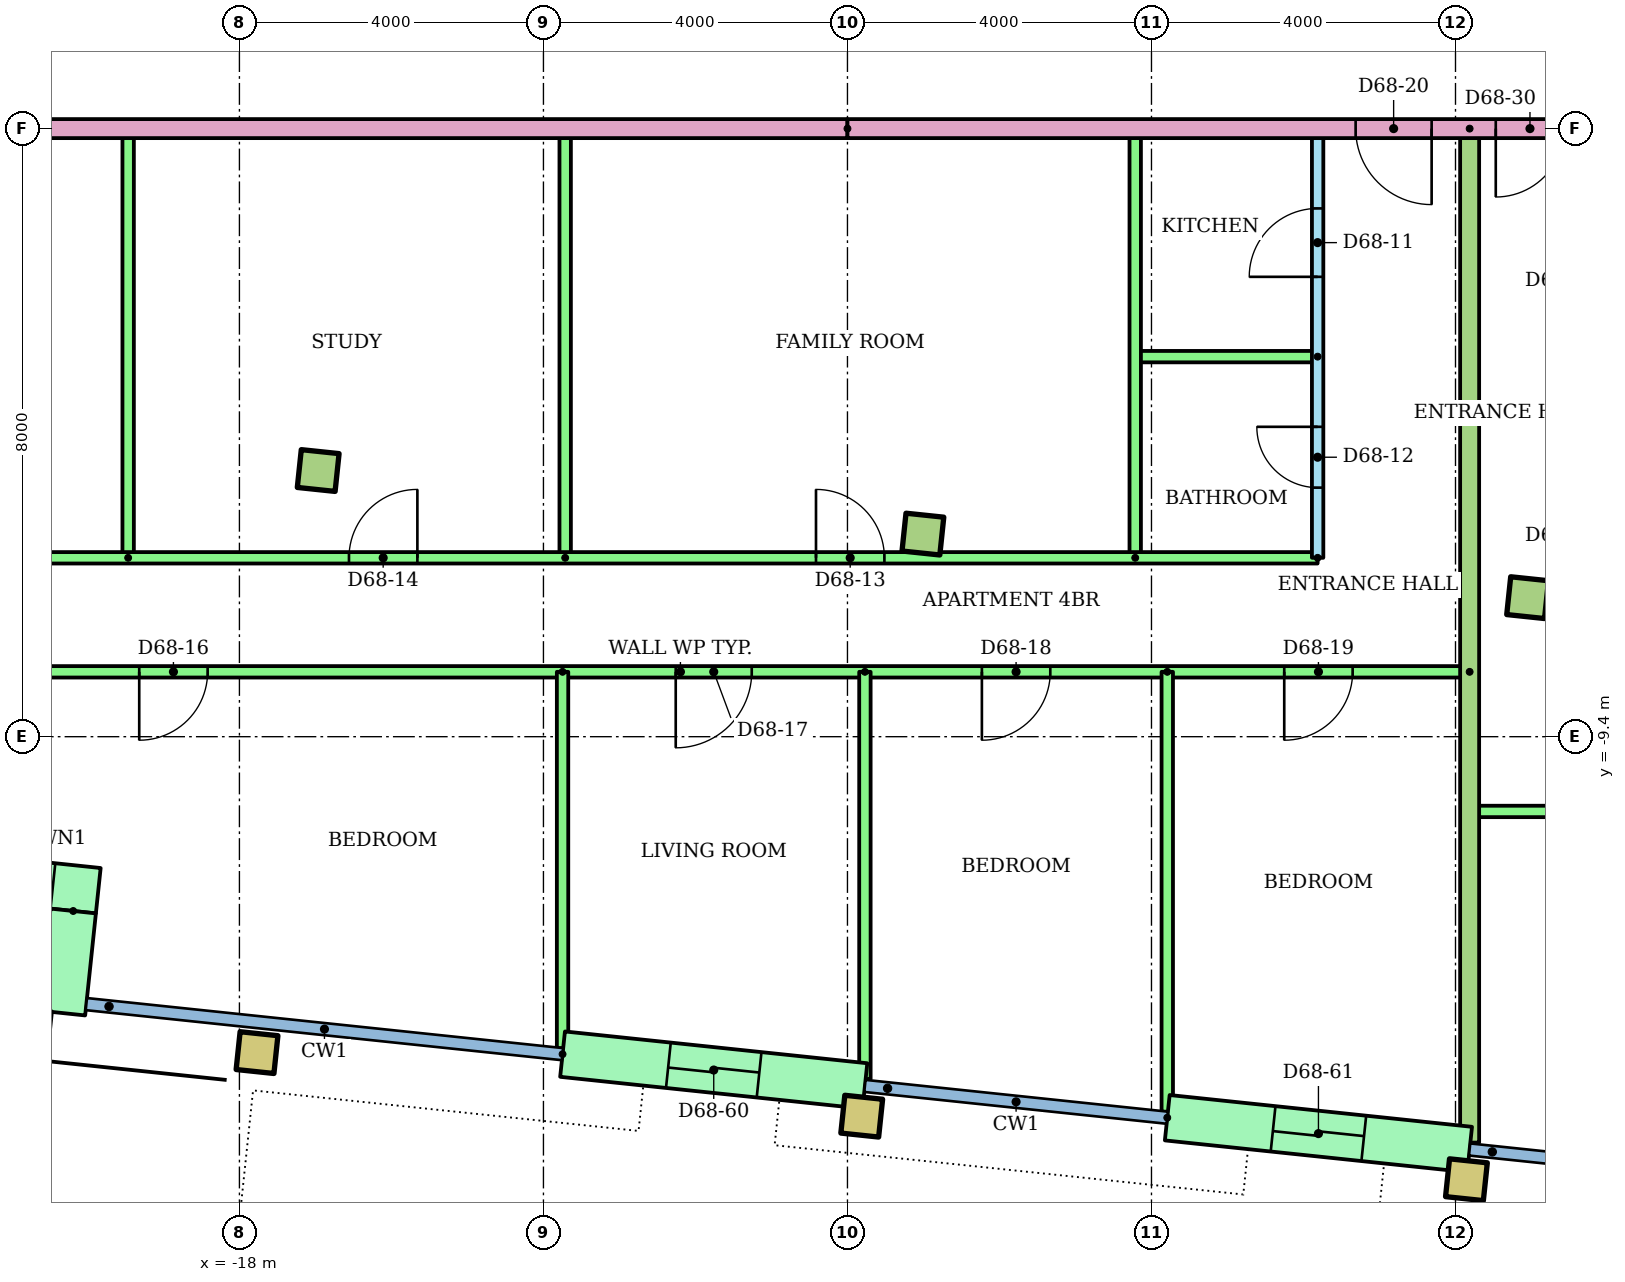
"""IFC4 building model, lengths in metres.
Left out: names, types, materials, properties, quantities, classifications, styles, units other than length and angle.
Written with IfcOpenShell. Run it as: python <this file> out.ifc"""

import sys

from ifc_helpers import new_model, si_unit, direction, frame, frame_2d, origin, origin_2d, place, context, subcontext, project, spatial, rectangle, hollow_rectangle, extrude, element, fill, save


model = new_model("IFC4")
c1 = context("Model", 3, precision=1e-05, world=origin(), true_north=direction((0.0, 1.0)))
c2 = subcontext(c1, "Body", "Model", "MODEL_VIEW")
j1 = project(units=[si_unit("LENGTHUNIT", "METRE"), si_unit("PLANEANGLEUNIT", "RADIAN")], contexts=[c1])
p1 = place(None, origin())
s1 = spatial("IfcSite", under=j1, at=p1, CompositionType="ELEMENT")
p2 = place(p1, origin())
s2 = spatial("IfcBuilding", under=s1, at=p2, CompositionType="ELEMENT")
p3 = place(p2, frame((0.0, 0.0, 262.7)))
s3 = spatial("IfcBuildingStorey", under=s2, at=p3, CompositionType="ELEMENT", Elevation=262.7)
for number, where, z_axis, x_axis in (
    (1, (-17.768, -13.556, 0.0), (0.0, 0.0, 1.0), (0.995, -0.105, 0.0)),
    (2, (-9.812, -14.392, 0.0), (0.0, 0.0, 1.0), (0.995, -0.105, 0.0)),
    (3, (-1.856, -15.229, 0.0), (0.0, 0.0, 1.0), (0.995, -0.105, 0.0)),
):
    element("IfcColumn", number, at=place(p3, frame(where, z_axis=z_axis, x_axis=x_axis)), inside=s3, PredefinedType="COLUMN", context=c2, shape_type="SweptSolid", body=[
        extrude(hollow_rectangle(XDim=0.5, YDim=0.5, WallThickness=0.025, at=origin_2d()), origin(), (0.0, 0.0, 1.0), 3.2),
    ])
for number, where, z_axis, x_axis in (
    (4, (-16.964, -5.898, 0.0), (0.0, 0.0, 1.0), (0.995, -0.105, 0.0)),
    (5, (-9.007, -6.735, 0.0), (0.0, 0.0, 1.0), (0.995, -0.105, 0.0)),
    (6, (-1.051, -7.571, 0.0), (0.0, 0.0, 1.0), (0.995, -0.105, 0.0)),
):
    element("IfcColumn", number, at=place(p3, frame(where, z_axis=z_axis, x_axis=x_axis)), inside=s3, PredefinedType="COLUMN", context=c2, shape_type="SweptSolid", body=[
        extrude(rectangle(XDim=0.5, YDim=0.5, at=origin_2d()), origin(), (0.0, 0.0, 1.0), 3.2),
    ])
p4 = place(p3, frame((-21.946, -11.207, 0.0), z_axis=(0.0, 0.0, 1.0), x_axis=(0.994511820899, -0.104624271047, 0.0)))
e7 = element("IfcWall", 7, at=p4, inside=s3, PredefinedType="STANDARD", context=c2, shape_type="SweptSolid", body=[
    extrude(rectangle(XDim=2.1, YDim=0.6, at=frame_2d((1.05, 0.0))), origin(), (0.0, 0.0, 1.0), 2.92),
])
p5 = place(p4, frame((0.6, 0.0, 0.9)))
e8 = element("IfcOpeningElement", 8, at=p5, cuts=e7, PredefinedType="OPENING", context=c2, shape_type="SweptSolid", body=[
    extrude(rectangle(XDim=0.9, YDim=1.5, at=frame_2d((0.45, 0.75))), frame((0.0, 0.31, 0.0), z_axis=(0.0, -1.0, 0.0), x_axis=(1.0, 0.0, 0.0)), (0.0, 0.0, 1.0), 0.62),
])
p6 = place(p3, frame((-20.187, -11.693, 0.0), z_axis=(0.0, 0.0, 1.0), x_axis=(-0.1043365026, -0.994542052517, 0.0)))
e9 = element("IfcWall", 9, at=p6, inside=s3, PredefinedType="STANDARD", context=c2, shape_type="SweptSolid", body=[
    extrude(rectangle(XDim=1.35, YDim=0.6, at=frame_2d((0.675, 0.0))), origin(), (0.0, 0.0, 1.0), 2.92),
])
p7 = place(p3, frame((-13.749, -13.576, 0.0), z_axis=(0.0, 0.0, 1.0), x_axis=(0.994519156568, -0.104554517933, 0.0)))
e10 = element("IfcWall", 10, at=p7, inside=s3, PredefinedType="STANDARD", context=c2, shape_type="SweptSolid", body=[
    extrude(rectangle(XDim=4.0, YDim=0.6, at=frame_2d((2.0, 0.0))), origin(), (0.0, 0.0, 1.0), 2.92),
])
p8 = place(p7, frame((1.4, 0.0, 0.0)))
e11 = element("IfcOpeningElement", 11, at=p8, cuts=e10, PredefinedType="OPENING", context=c2, shape_type="SweptSolid", body=[
    extrude(rectangle(XDim=1.2, YDim=2.1, at=frame_2d((0.6, 1.05))), frame((0.0, 0.31, 0.0), z_axis=(0.0, -1.0, 0.0), x_axis=(1.0, 0.0, 0.0)), (0.0, 0.0, 1.0), 0.62),
])
p9 = place(p3, frame((-5.792, -14.413, 0.0), z_axis=(0.0, 0.0, 1.0), x_axis=(0.99452550138, -0.104494148666, 0.0)))
e12 = element("IfcWall", 12, at=p9, inside=s3, PredefinedType="STANDARD", context=c2, shape_type="SweptSolid", body=[
    extrude(rectangle(XDim=4.0, YDim=0.6, at=frame_2d((2.0, 0.0))), origin(), (0.0, 0.0, 1.0), 2.92),
])
p10 = place(p9, frame((1.4, 0.0, 0.0)))
e13 = element("IfcOpeningElement", 13, at=p10, cuts=e12, PredefinedType="OPENING", context=c2, shape_type="SweptSolid", body=[
    extrude(rectangle(XDim=1.2, YDim=2.1, at=frame_2d((0.6, 1.05))), frame((0.0, 0.31, 0.0), z_axis=(0.0, -1.0, 0.0), x_axis=(1.0, 0.0, 0.0)), (0.0, 0.0, 1.0), 0.62),
])
p11 = place(p3, frame((-3.814, -7.047, 0.0), z_axis=(0.0, 0.0, 1.0), x_axis=(0.0, 1.0, 0.0)))
e14 = element("IfcWall", 14, at=p11, inside=s3, PredefinedType="PARTITIONING", context=c2, shape_type="SweptSolid", body=[
    extrude(rectangle(XDim=5.647, YDim=0.15, at=frame_2d((2.823, 0.0))), origin(), (0.0, 0.0, 1.0), 2.4),
])
p12 = place(p11, frame((3.697, 0.0, 0.0)))
e15 = element("IfcOpeningElement", 15, at=p12, cuts=e14, PredefinedType="OPENING", context=c2, shape_type="SweptSolid", body=[
    extrude(rectangle(XDim=0.9, YDim=2.1, at=frame_2d((0.45, 1.05))), frame((0.0, 0.085, 0.0), z_axis=(0.0, -1.0, 0.0), x_axis=(1.0, 0.0, 0.0)), (0.0, 0.0, 1.0), 0.17),
])
p13 = place(p11, frame((0.923, 0.0, 0.0)))
e16 = element("IfcOpeningElement", 16, at=p13, cuts=e14, PredefinedType="OPENING", context=c2, shape_type="SweptSolid", body=[
    extrude(rectangle(XDim=0.8, YDim=2.1, at=frame_2d((0.4, 1.05))), frame((0.0, 0.085, 0.0), z_axis=(0.0, -1.0, 0.0), x_axis=(1.0, 0.0, 0.0)), (0.0, 0.0, 1.0), 0.17),
])
p14 = place(p3, frame((-3.814, -4.4, 0.0), z_axis=(0.0, 0.0, 1.0), x_axis=(-1.0, 0.0, 0.0)))
e17 = element("IfcWall", 17, at=p14, inside=s3, PredefinedType="PARTITIONING", context=c2, shape_type="SweptSolid", body=[
    extrude(rectangle(XDim=2.4, YDim=0.15, at=frame_2d((1.2, 0.0))), origin(), (0.0, 0.0, 1.0), 2.4),
])
for number, where, z_axis, x_axis in (
    (18, (-6.214, -7.047, 0.0), (0.0, 0.0, 1.0), (0.0, 1.0, 0.0)),
    (19, (-13.714, -7.047, 0.0), (0.0, 0.0, 1.0), (0.0, 1.0, 0.0)),
    (20, (-19.464, -7.047, 0.0), (0.0, 0.0, 1.0), (0.0, 1.0, 0.0)),
):
    element("IfcWall", number, at=place(p3, frame(where, z_axis=z_axis, x_axis=x_axis)), inside=s3, PredefinedType="PARTITIONING", context=c2, shape_type="SweptSolid", body=[
        extrude(rectangle(XDim=5.647, YDim=0.15, at=frame_2d((2.823, 0.0))), origin(), (0.0, 0.0, 1.0), 2.4),
    ])
p15 = place(p3, frame((-24.144, -7.047, 0.0)))
e21 = element("IfcWall", 21, at=p15, inside=s3, PredefinedType="PARTITIONING", context=c2, shape_type="SweptSolid", body=[
    extrude(rectangle(XDim=20.33, YDim=0.15, at=frame_2d((10.165, 0.0))), origin(), (0.0, 0.0, 1.0), 2.4),
])
p16 = place(p15, frame((13.73, 0.0, 0.0)))
e22 = element("IfcOpeningElement", 22, at=p16, cuts=e21, PredefinedType="OPENING", context=c2, shape_type="SweptSolid", body=[
    extrude(rectangle(XDim=0.9, YDim=2.1, at=frame_2d((0.45, 1.05))), frame((0.0, 0.085, 0.0), z_axis=(0.0, -1.0, 0.0), x_axis=(1.0, 0.0, 0.0)), (0.0, 0.0, 1.0), 0.17),
])
p17 = place(p15, frame((7.585, 0.0, 0.0)))
e23 = element("IfcOpeningElement", 23, at=p17, cuts=e21, PredefinedType="OPENING", context=c2, shape_type="SweptSolid", body=[
    extrude(rectangle(XDim=0.9, YDim=2.1, at=frame_2d((0.45, 1.05))), frame((0.0, 0.085, 0.0), z_axis=(0.0, -1.0, 0.0), x_axis=(1.0, 0.0, 0.0)), (0.0, 0.0, 1.0), 0.17),
])
p18 = place(p15, frame((1.968, 0.0, 0.0)))
e24 = element("IfcOpeningElement", 24, at=p18, cuts=e21, PredefinedType="OPENING", context=c2, shape_type="SweptSolid", body=[
    extrude(rectangle(XDim=0.9, YDim=2.1, at=frame_2d((0.45, 1.05))), frame((0.0, 0.085, 0.0), z_axis=(0.0, -1.0, 0.0), x_axis=(1.0, 0.0, 0.0)), (0.0, 0.0, 1.0), 0.17),
])
p19 = place(p3, frame((-1.814, -8.547, 0.0), z_axis=(0.0, 0.0, 1.0), x_axis=(-1.0, 0.0, 0.0)))
e25 = element("IfcWall", 25, at=p19, inside=s3, PredefinedType="PARTITIONING", context=c2, shape_type="SweptSolid", body=[
    extrude(rectangle(XDim=20.767, YDim=0.15, at=frame_2d((10.384, 0.0))), origin(), (0.0, 0.0, 1.0), 2.4),
])
p20 = place(p19, frame((16.604, 0.0, 0.0)))
e26 = element("IfcOpeningElement", 26, at=p20, cuts=e25, PredefinedType="OPENING", context=c2, shape_type="SweptSolid", body=[
    extrude(rectangle(XDim=0.9, YDim=2.1, at=frame_2d((0.45, 1.05))), frame((0.0, 0.085, 0.0), z_axis=(0.0, -1.0, 0.0), x_axis=(1.0, 0.0, 0.0)), (0.0, 0.0, 1.0), 0.17),
])
p21 = place(p19, frame((9.446, 0.0, 0.0)))
e27 = element("IfcOpeningElement", 27, at=p21, cuts=e25, PredefinedType="OPENING", context=c2, shape_type="SweptSolid", body=[
    extrude(rectangle(XDim=1.0, YDim=2.1, at=frame_2d((0.5, 1.05))), frame((0.0, 0.085, 0.0), z_axis=(0.0, -1.0, 0.0), x_axis=(1.0, 0.0, 0.0)), (0.0, 0.0, 1.0), 0.17),
])
p22 = place(p19, frame((5.517, 0.0, 0.0)))
e28 = element("IfcOpeningElement", 28, at=p22, cuts=e25, PredefinedType="OPENING", context=c2, shape_type="SweptSolid", body=[
    extrude(rectangle(XDim=0.9, YDim=2.1, at=frame_2d((0.45, 1.05))), frame((0.0, 0.085, 0.0), z_axis=(0.0, -1.0, 0.0), x_axis=(1.0, 0.0, 0.0)), (0.0, 0.0, 1.0), 0.17),
])
p23 = place(p19, frame((1.539, 0.0, 0.0)))
e29 = element("IfcOpeningElement", 29, at=p23, cuts=e25, PredefinedType="OPENING", context=c2, shape_type="SweptSolid", body=[
    extrude(rectangle(XDim=0.9, YDim=2.1, at=frame_2d((0.45, 1.05))), frame((0.0, 0.085, 0.0), z_axis=(0.0, -1.0, 0.0), x_axis=(1.0, 0.0, 0.0)), (0.0, 0.0, 1.0), 0.17),
])
p24 = place(p3, frame((-13.749, -8.547, 0.0), z_axis=(0.0, 0.0, 1.0), x_axis=(0.0, -1.0, 0.0)))
e30 = element("IfcWall", 30, at=p24, inside=s3, PredefinedType="PARTITIONING", context=c2, shape_type="SweptSolid", body=[
    extrude(rectangle(XDim=4.95, YDim=0.15, at=frame_2d((2.475, 0.0))), origin(), (0.0, 0.0, 1.0), 2.4),
])
p25 = place(p3, frame((-9.771, -8.547, 0.0), z_axis=(0.0, 0.0, 1.0), x_axis=(0.0, -1.0, 0.0)))
e31 = element("IfcWall", 31, at=p25, inside=s3, PredefinedType="PARTITIONING", context=c2, shape_type="SweptSolid", body=[
    extrude(rectangle(XDim=5.358, YDim=0.15, at=frame_2d((2.679, 0.0))), origin(), (0.0, 0.0, 1.0), 2.4),
])
p26 = place(p3, frame((-5.792, -8.547, 0.0), z_axis=(0.0, 0.0, 1.0), x_axis=(0.0, -1.0, 0.0)))
e32 = element("IfcWall", 32, at=p26, inside=s3, PredefinedType="PARTITIONING", context=c2, shape_type="SweptSolid", body=[
    extrude(rectangle(XDim=5.787, YDim=0.15, at=frame_2d((2.893, 0.0))), origin(), (0.0, 0.0, 1.0), 2.4),
])
p27 = place(p3, frame((14.098, -10.384, 0.0), z_axis=(0.0, 0.0, 1.0), x_axis=(-1.0, 0.0, 0.0)))
e33 = element("IfcWall", 33, at=p27, inside=s3, PredefinedType="PARTITIONING", context=c2, shape_type="SweptSolid", body=[
    extrude(rectangle(XDim=15.912, YDim=0.15, at=frame_2d((7.956, 0.0))), origin(), (0.0, 0.0, 1.0), 2.4),
])
p28 = place(p27, frame((13.473, 0.0, 0.0)))
e34 = element("IfcOpeningElement", 34, at=p28, cuts=e33, PredefinedType="OPENING", context=c2, shape_type="SweptSolid", body=[
    extrude(rectangle(XDim=0.9, YDim=2.1, at=frame_2d((0.45, 1.05))), frame((0.0, 0.085, 0.0), z_axis=(0.0, -1.0, 0.0), x_axis=(1.0, 0.0, 0.0)), (0.0, 0.0, 1.0), 0.17),
])
p29 = place(p27, frame((9.495, 0.0, 0.0)))
e35 = element("IfcOpeningElement", 35, at=p29, cuts=e33, PredefinedType="OPENING", context=c2, shape_type="SweptSolid", body=[
    extrude(rectangle(XDim=0.9, YDim=2.1, at=frame_2d((0.45, 1.05))), frame((0.0, 0.085, 0.0), z_axis=(0.0, -1.0, 0.0), x_axis=(1.0, 0.0, 0.0)), (0.0, 0.0, 1.0), 0.17),
])
p30 = place(p27, frame((5.517, 0.0, 0.0)))
e36 = element("IfcOpeningElement", 36, at=p30, cuts=e33, PredefinedType="OPENING", context=c2, shape_type="SweptSolid", body=[
    extrude(rectangle(XDim=0.9, YDim=2.1, at=frame_2d((0.45, 1.05))), frame((0.0, 0.085, 0.0), z_axis=(0.0, -1.0, 0.0), x_axis=(1.0, 0.0, 0.0)), (0.0, 0.0, 1.0), 0.17),
])
p31 = place(p27, frame((1.489, 0.0, 0.0)))
e37 = element("IfcOpeningElement", 37, at=p31, cuts=e33, PredefinedType="OPENING", context=c2, shape_type="SweptSolid", body=[
    extrude(rectangle(XDim=1.0, YDim=2.1, at=frame_2d((0.5, 1.05))), frame((0.0, 0.085, 0.0), z_axis=(0.0, -1.0, 0.0), x_axis=(1.0, 0.0, 0.0)), (0.0, 0.0, 1.0), 0.17),
])
p32 = place(p3, frame((-1.814, -1.4, 0.0), z_axis=(0.0, 0.0, 1.0), x_axis=(0.0, -1.0, 0.0)))
e38 = element("IfcWall", 38, at=p32, inside=s3, PredefinedType="PARTITIONING", context=c2, shape_type="SweptSolid", body=[
    extrude(rectangle(XDim=13.341, YDim=0.25, at=frame_2d((6.67, 0.0))), origin(), (0.0, 0.0, 1.0), 2.4),
])
p33 = place(p3, frame((-10.0, -1.4, 0.0), z_axis=(0.0, 0.0, 1.0), x_axis=(-1.0, 0.0, 0.0)))
e39 = element("IfcWall", 39, at=p33, inside=s3, PredefinedType="PARTITIONING", context=c2, shape_type="SweptSolid", body=[
    extrude(rectangle(XDim=13.56, YDim=0.25, at=frame_2d((6.78, 0.0))), origin(), (0.0, 0.0, 1.0), 2.4),
])
p34 = place(p3, frame((10.0, -1.4, 0.0), z_axis=(0.0, 0.0, 1.0), x_axis=(-1.0, 0.0, 0.0)))
e40 = element("IfcWall", 40, at=p34, inside=s3, PredefinedType="PARTITIONING", context=c2, shape_type="SweptSolid", body=[
    extrude(rectangle(XDim=20.0, YDim=0.25, at=frame_2d((10.0, 0.0))), origin(), (0.0, 0.0, 1.0), 2.4),
])
p35 = place(p34, frame((12.314, 0.0, 0.0)))
e41 = element("IfcOpeningElement", 41, at=p35, cuts=e40, PredefinedType="OPENING", context=c2, shape_type="SweptSolid", body=[
    extrude(rectangle(XDim=1.0, YDim=2.1, at=frame_2d((0.5, 1.05))), frame((0.0, 0.135, 0.0), z_axis=(0.0, -1.0, 0.0), x_axis=(1.0, 0.0, 0.0)), (0.0, 0.0, 1.0), 0.27),
])
p36 = place(p34, frame((10.57, 0.0, 0.0)))
e42 = element("IfcOpeningElement", 42, at=p36, cuts=e40, PredefinedType="OPENING", context=c2, shape_type="SweptSolid", body=[
    extrude(rectangle(XDim=0.9, YDim=2.1, at=frame_2d((0.45, 1.05))), frame((0.0, 0.135, 0.0), z_axis=(0.0, -1.0, 0.0), x_axis=(1.0, 0.0, 0.0)), (0.0, 0.0, 1.0), 0.27),
])
p37 = place(p5, origin())
e43 = element("IfcWindow", 43, at=p37, inside=s3, PartitioningType="SINGLE_PANEL", PredefinedType="WINDOW", context=c2, shape_type="SweptSolid", body=[
    extrude(rectangle(XDim=0.9, YDim=1.5, at=frame_2d((0.45, 0.75))), frame((0.0, 0.03, 0.0), z_axis=(0.0, -1.0, 0.0), x_axis=(1.0, 0.0, 0.0)), (0.0, 0.0, 1.0), 0.06),
])
fill(e8, e43)
p38 = place(p12, origin())
e44 = element("IfcDoor", 44, at=p38, inside=s3, OperationType="SINGLE_SWING_LEFT", PredefinedType="DOOR", context=c2, shape_type="SweptSolid", body=[
    extrude(rectangle(XDim=0.9, YDim=2.1, at=frame_2d((0.45, 1.05))), frame((0.0, 0.025, 0.0), z_axis=(0.0, -1.0, 0.0), x_axis=(1.0, 0.0, 0.0)), (0.0, 0.0, 1.0), 0.05),
])
fill(e15, e44)
p39 = place(p13, origin())
e45 = element("IfcDoor", 45, at=p39, inside=s3, OperationType="SINGLE_SWING_RIGHT", PredefinedType="DOOR", context=c2, shape_type="SweptSolid", body=[
    extrude(rectangle(XDim=0.8, YDim=2.1, at=frame_2d((0.4, 1.05))), frame((0.0, 0.025, 0.0), z_axis=(0.0, -1.0, 0.0), x_axis=(1.0, 0.0, 0.0)), (0.0, 0.0, 1.0), 0.05),
])
fill(e16, e45)
p40 = place(p16, origin())
e46 = element("IfcDoor", 46, at=p40, inside=s3, OperationType="SINGLE_SWING_LEFT", PredefinedType="DOOR", context=c2, shape_type="SweptSolid", body=[
    extrude(rectangle(XDim=0.9, YDim=2.1, at=frame_2d((0.45, 1.05))), frame((0.0, 0.025, 0.0), z_axis=(0.0, -1.0, 0.0), x_axis=(1.0, 0.0, 0.0)), (0.0, 0.0, 1.0), 0.05),
])
fill(e22, e46)
p41 = place(p17, origin())
e47 = element("IfcDoor", 47, at=p41, inside=s3, OperationType="SINGLE_SWING_RIGHT", PredefinedType="DOOR", context=c2, shape_type="SweptSolid", body=[
    extrude(rectangle(XDim=0.9, YDim=2.1, at=frame_2d((0.45, 1.05))), frame((0.0, 0.025, 0.0), z_axis=(0.0, -1.0, 0.0), x_axis=(1.0, 0.0, 0.0)), (0.0, 0.0, 1.0), 0.05),
])
fill(e23, e47)
p42 = place(p20, origin())
e48 = element("IfcDoor", 48, at=p42, inside=s3, OperationType="SINGLE_SWING_RIGHT", PredefinedType="DOOR", context=c2, shape_type="SweptSolid", body=[
    extrude(rectangle(XDim=0.9, YDim=2.1, at=frame_2d((0.45, 1.05))), frame((0.0, 0.025, 0.0), z_axis=(0.0, -1.0, 0.0), x_axis=(1.0, 0.0, 0.0)), (0.0, 0.0, 1.0), 0.05),
])
fill(e26, e48)
p43 = place(p21, origin())
e49 = element("IfcDoor", 49, at=p43, inside=s3, OperationType="SINGLE_SWING_RIGHT", PredefinedType="DOOR", context=c2, shape_type="SweptSolid", body=[
    extrude(rectangle(XDim=1.0, YDim=2.1, at=frame_2d((0.5, 1.05))), frame((0.0, 0.025, 0.0), z_axis=(0.0, -1.0, 0.0), x_axis=(1.0, 0.0, 0.0)), (0.0, 0.0, 1.0), 0.05),
])
fill(e27, e49)
p44 = place(p22, origin())
e50 = element("IfcDoor", 50, at=p44, inside=s3, OperationType="SINGLE_SWING_RIGHT", PredefinedType="DOOR", context=c2, shape_type="SweptSolid", body=[
    extrude(rectangle(XDim=0.9, YDim=2.1, at=frame_2d((0.45, 1.05))), frame((0.0, 0.025, 0.0), z_axis=(0.0, -1.0, 0.0), x_axis=(1.0, 0.0, 0.0)), (0.0, 0.0, 1.0), 0.05),
])
fill(e28, e50)
p45 = place(p23, origin())
e51 = element("IfcDoor", 51, at=p45, inside=s3, OperationType="SINGLE_SWING_RIGHT", PredefinedType="DOOR", context=c2, shape_type="SweptSolid", body=[
    extrude(rectangle(XDim=0.9, YDim=2.1, at=frame_2d((0.45, 1.05))), frame((0.0, 0.025, 0.0), z_axis=(0.0, -1.0, 0.0), x_axis=(1.0, 0.0, 0.0)), (0.0, 0.0, 1.0), 0.05),
])
fill(e29, e51)
p46 = place(p35, origin())
e52 = element("IfcDoor", 52, at=p46, inside=s3, OperationType="SINGLE_SWING_LEFT", PredefinedType="DOOR", context=c2, shape_type="SweptSolid", body=[
    extrude(rectangle(XDim=1.0, YDim=2.1, at=frame_2d((0.5, 1.05))), frame((0.0, 0.025, 0.0), z_axis=(0.0, -1.0, 0.0), x_axis=(1.0, 0.0, 0.0)), (0.0, 0.0, 1.0), 0.05),
])
fill(e41, e52)
p47 = place(p36, origin())
e53 = element("IfcDoor", 53, at=p47, inside=s3, OperationType="SINGLE_SWING_RIGHT", PredefinedType="DOOR", context=c2, shape_type="SweptSolid", body=[
    extrude(rectangle(XDim=0.9, YDim=2.1, at=frame_2d((0.45, 1.05))), frame((0.0, 0.025, 0.0), z_axis=(0.0, -1.0, 0.0), x_axis=(1.0, 0.0, 0.0)), (0.0, 0.0, 1.0), 0.05),
])
fill(e42, e53)
p48 = place(p8, origin())
e54 = element("IfcDoor", 54, at=p48, inside=s3, OperationType="SLIDING_TO_LEFT", PredefinedType="DOOR", context=c2, shape_type="SweptSolid", body=[
    extrude(rectangle(XDim=1.2, YDim=2.1, at=frame_2d((0.6, 1.05))), frame((0.0, 0.025, 0.0), z_axis=(0.0, -1.0, 0.0), x_axis=(1.0, 0.0, 0.0)), (0.0, 0.0, 1.0), 0.05),
])
fill(e11, e54)
p49 = place(p10, origin())
e55 = element("IfcDoor", 55, at=p49, inside=s3, OperationType="SLIDING_TO_LEFT", PredefinedType="DOOR", context=c2, shape_type="SweptSolid", body=[
    extrude(rectangle(XDim=1.2, YDim=2.1, at=frame_2d((0.6, 1.05))), frame((0.0, 0.025, 0.0), z_axis=(0.0, -1.0, 0.0), x_axis=(1.0, 0.0, 0.0)), (0.0, 0.0, 1.0), 0.05),
])
fill(e13, e55)
save(model, sys.argv[1])
